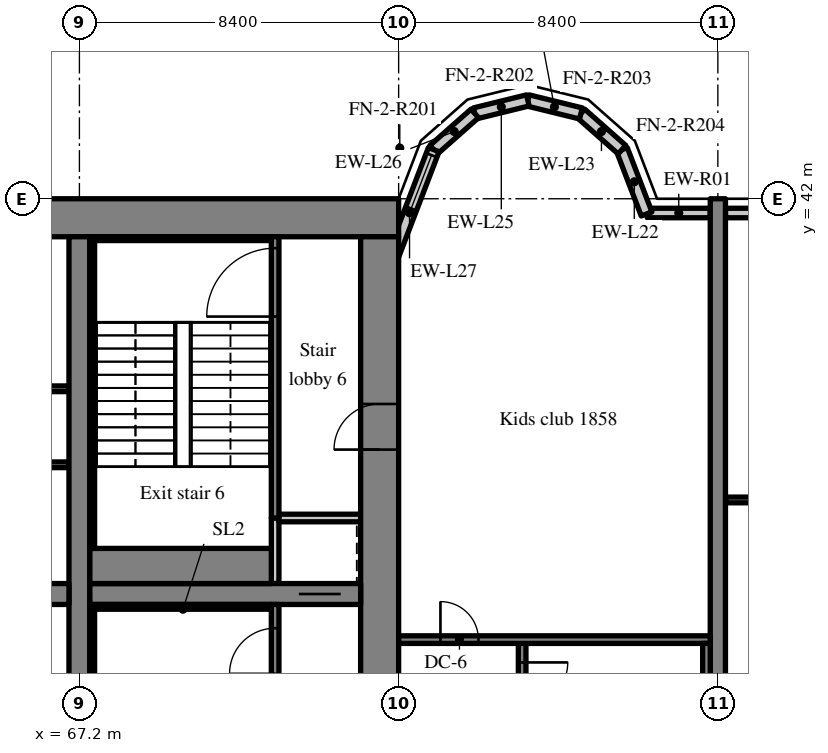
"""IFC4 building model, lengths in metres.
Left out: names, types, materials, properties, quantities, classifications, styles, units other than length and angle.
Written with IfcOpenShell. Run it as: python <this file> out.ifc"""

import sys

from ifc_helpers import new_model, si_unit, direction, frame, frame_2d, origin, place, context, subcontext, project, spatial, rectangle, extrude, source, transform, mapped, element, fill, save


model = new_model("IFC4")
c1 = context("Model", 3, precision=1e-05, world=origin(), true_north=direction((0.0, 1.0)))
c2 = subcontext(c1, "Body", "Model", "MODEL_VIEW")
j1 = project(units=[si_unit("LENGTHUNIT", "METRE"), si_unit("PLANEANGLEUNIT", "RADIAN")], contexts=[c1])
p1 = place(None, origin())
s1 = spatial("IfcSite", under=j1, at=p1, CompositionType="ELEMENT")
p2 = place(p1, origin())
s2 = spatial("IfcBuilding", under=s1, at=p2, CompositionType="ELEMENT")
p3 = place(p2, frame((0.0, 0.0, 77.2)))
s3 = spatial("IfcBuildingStorey", under=s2, at=p3, CompositionType="ELEMENT", Elevation=77.2)
m1 = source(origin(), c2, "Body", "SweptSolid", [
    extrude(rectangle(XDim=50.4, YDim=1.0, at=frame_2d((25.2, 0.0))), origin(), (0.0, 0.0, 1.0), 3.52),
])
p4 = place(p3, frame((25.2, 41.5, 0.0), z_axis=(0.0, 0.0, 1.0), x_axis=(1.0, 0.0, 0.0)))
e1 = element("IfcWall", 1, at=p4, inside=s3, PredefinedType="SHEAR", context=c2, shape_type="MappedRepresentation", body=[
    mapped(m1, transform((0.0, 0.0, 0.0), scale=1.0)),
])
m2 = source(origin(), c2, "Body", "SweptSolid", [
    extrude(rectangle(XDim=18.0, YDim=1.0, at=frame_2d((9.0, 0.0))), origin(), (0.0, 0.0, 1.0), 3.52),
])
p5 = place(p3, frame((75.1, 23.0, 0.0), z_axis=(0.0, 0.0, 1.0), x_axis=(0.0, 1.0, 0.0)))
e2 = element("IfcWall", 2, at=p5, inside=s3, PredefinedType="SHEAR", context=c2, shape_type="MappedRepresentation", body=[
    mapped(m2, transform((0.0, 0.0, 0.0), scale=1.0)),
])
m3 = source(origin(), c2, "Body", "SweptSolid", [
    extrude(rectangle(XDim=1.2, YDim=2.1, at=frame_2d((0.6, 1.05))), frame((0.0, 0.51, 0.0), z_axis=(0.0, -1.0, 0.0), x_axis=(1.0, 0.0, 0.0)), (0.0, 0.0, 1.0), 1.02),
])
p6 = place(p5, frame((12.4, 0.0, 0.0)))
e3 = element("IfcOpeningElement", 3, at=p6, cuts=e2, PredefinedType="OPENING", context=c2, shape_type="MappedRepresentation", body=[
    mapped(m3, transform((0.0, 0.0, 0.0), scale=1.0)),
])
m4 = source(origin(), c2, "Body", "SweptSolid", [
    extrude(rectangle(XDim=18.0, YDim=0.55, at=frame_2d((9.0, 0.0))), origin(), (0.0, 0.0, 1.0), 3.52),
])
p7 = place(p3, frame((67.2, 23.0, 0.0), z_axis=(0.0, 0.0, 1.0), x_axis=(0.0, 1.0, 0.0)))
e4 = element("IfcWall", 4, at=p7, inside=s3, PredefinedType="SHEAR", context=c2, shape_type="MappedRepresentation", body=[
    mapped(m4, transform((0.0, 0.0, 0.0), scale=1.0)),
])
m5 = source(origin(), c2, "Body", "SweptSolid", [
    extrude(rectangle(XDim=16.25, YDim=0.55, at=frame_2d((8.125, 0.0))), origin(), (0.0, 0.0, 1.0), 3.52),
])
p8 = place(p3, frame((50.675, 31.6, 0.0), z_axis=(0.0, 0.0, 1.0), x_axis=(1.0, 0.0, 0.0)))
e5 = element("IfcWall", 5, at=p8, inside=s3, PredefinedType="SHEAR", context=c2, shape_type="MappedRepresentation", body=[
    mapped(m5, transform((0.0, 0.0, 0.0), scale=1.0)),
])
m6 = source(origin(), c2, "Body", "SweptSolid", [
    extrude(rectangle(XDim=1.0, YDim=2.1, at=frame_2d((0.5, 1.05))), frame((0.0, 0.285, 0.0), z_axis=(0.0, -1.0, 0.0), x_axis=(1.0, 0.0, 0.0)), (0.0, 0.0, 1.0), 0.57),
])
p9 = place(p8, frame((0.562, 0.0, 0.0)))
e6 = element("IfcOpeningElement", 6, at=p9, cuts=e5, PredefinedType="OPENING", context=c2, shape_type="MappedRepresentation", body=[
    mapped(m6, transform((0.0, 0.0, 0.0), scale=1.0)),
])
m7 = source(origin(), c2, "Body", "SweptSolid", [
    extrude(rectangle(XDim=7.125, YDim=0.55, at=frame_2d((3.562, 0.0))), origin(), (0.0, 0.0, 1.0), 3.52),
])
p10 = place(p3, frame((67.475, 31.6, 0.0), z_axis=(0.0, 0.0, 1.0), x_axis=(1.0, 0.0, 0.0)))
e7 = element("IfcWall", 7, at=p10, inside=s3, PredefinedType="SHEAR", context=c2, shape_type="MappedRepresentation", body=[
    mapped(m7, transform((0.0, 0.0, 0.0), scale=1.0)),
])
m8 = source(origin(), c2, "Body", "SweptSolid", [
    extrude(rectangle(XDim=1.1, YDim=2.1, at=frame_2d((0.55, 1.05))), frame((0.0, 0.285, 0.0), z_axis=(0.0, -1.0, 0.0), x_axis=(1.0, 0.0, 0.0)), (0.0, 0.0, 1.0), 0.57),
])
p11 = place(p10, frame((5.5, 0.0, 0.0)))
e8 = element("IfcOpeningElement", 8, at=p11, cuts=e7, PredefinedType="OPENING", context=c2, shape_type="MappedRepresentation", body=[
    mapped(m8, transform((0.0, 0.0, 0.0), scale=1.0)),
])
m9 = source(origin(), c2, "Body", "SweptSolid", [
    extrude(rectangle(XDim=20.0, YDim=0.4, at=frame_2d((10.0, 0.0))), origin(), (0.0, 0.0, 1.0), 3.52),
])
p12 = place(p3, frame((84.0, 22.0, 0.0), z_axis=(0.0, 0.0, 1.0), x_axis=(0.0, 1.0, 0.0)))
e9 = element("IfcWall", 9, at=p12, inside=s3, PredefinedType="SHEAR", context=c2, shape_type="MappedRepresentation", body=[
    mapped(m9, transform((0.0, 0.0, 0.0), scale=1.0)),
])
m10 = source(origin(), c2, "Body", "SweptSolid", [
    extrude(rectangle(XDim=1.658, YDim=0.25, at=frame_2d((0.829, 0.0))), origin(), (0.0, 0.0, 1.0), 2.82),
])
p13 = place(p3, frame((83.8, 41.625, 0.0), z_axis=(0.0, 0.0, 1.0), x_axis=(-1.0, 0.0, 0.0)))
e10 = element("IfcWall", 10, at=p13, inside=s3, PredefinedType="SOLIDWALL", context=c2, shape_type="MappedRepresentation", body=[
    mapped(m10, transform((0.0, 0.0, 0.0), scale=1.0)),
])
m11 = source(origin(), c2, "Body", "SweptSolid", [
    extrude(rectangle(XDim=3.6, YDim=0.25, at=frame_2d((1.8, 0.0))), origin(), (0.0, 0.0, 1.0), 2.82),
])
p14 = place(p3, frame((87.8, 41.625, 0.0), z_axis=(0.0, 0.0, 1.0), x_axis=(-1.0, 0.0, 0.0)))
e11 = element("IfcWall", 11, at=p14, inside=s3, PredefinedType="SOLIDWALL", context=c2, shape_type="MappedRepresentation", body=[
    mapped(m11, transform((0.0, 0.0, 0.0), scale=1.0)),
])
m12 = source(origin(), c2, "Body", "SweptSolid", [
    extrude(rectangle(XDim=1.5, YDim=1.5, at=frame_2d((0.75, 0.75))), frame((0.0, 0.135, 0.0), z_axis=(0.0, -1.0, 0.0), x_axis=(1.0, 0.0, 0.0)), (0.0, 0.0, 1.0), 0.27),
])
p15 = place(p14, frame((1.05, 0.0, 0.9)))
e12 = element("IfcOpeningElement", 12, at=p15, cuts=e11, PredefinedType="OPENING", context=c2, shape_type="MappedRepresentation", body=[
    mapped(m12, transform((0.0, 0.0, 0.0), scale=1.0)),
])
m13 = source(origin(), c2, "Body", "SweptSolid", [
    extrude(rectangle(XDim=1.812, YDim=0.3, at=frame_2d((0.906, 0.0))), origin(), (0.0, 0.0, 1.0), 3.52),
])
p16 = place(p3, frame((82.125, 41.6, 0.0), z_axis=(0.0, 0.0, 1.0), x_axis=(-0.357877270961, 0.93376863244, 0.0)))
e13 = element("IfcWall", 13, at=p16, inside=s3, PredefinedType="SOLIDWALL", context=c2, shape_type="MappedRepresentation", body=[
    mapped(m13, transform((0.0, 0.0, 0.0), scale=1.0)),
])
m14 = source(origin(), c2, "Body", "SweptSolid", [
    extrude(rectangle(XDim=1.44, YDim=0.3, at=frame_2d((0.72, 0.0))), origin(), (0.0, 0.0, 1.0), 3.52),
])
p17 = place(p3, frame((81.477, 43.292, 0.0), z_axis=(0.0, 0.0, 1.0), x_axis=(-0.74957555648, 0.661918790432, 0.0)))
e14 = element("IfcWall", 14, at=p17, inside=s3, PredefinedType="SOLIDWALL", context=c2, shape_type="MappedRepresentation", body=[
    mapped(m14, transform((0.0, 0.0, 0.0), scale=1.0)),
])
m15 = source(origin(), c2, "Body", "SweptSolid", [
    extrude(rectangle(XDim=1.439, YDim=0.3, at=frame_2d((0.719, 0.0))), origin(), (0.0, 0.0, 1.0), 3.52),
])
for number, where, z_axis, x_axis in (
    (15, (80.397, 44.245, 0.0), (0.0, 0.0, 1.0), (-0.971, 0.238, 0.0)),
    (16, (79.0, 44.588, 0.0), (0.0, 0.0, 1.0), (-0.971, -0.238, 0.0)),
):
    element("IfcWall", number, at=place(p3, frame(where, z_axis=z_axis, x_axis=x_axis)), inside=s3, PredefinedType="SOLIDWALL", context=c2, shape_type="MappedRepresentation", body=[
        mapped(m15, transform((0.0, 0.0, 0.0), scale=1.0)),
    ])
p18 = place(p3, frame((77.603, 44.245, 0.0), z_axis=(0.0, 0.0, 1.0), x_axis=(-0.74957555648, -0.661918790432, 0.0)))
e17 = element("IfcWall", 17, at=p18, inside=s3, PredefinedType="SOLIDWALL", context=c2, shape_type="MappedRepresentation", body=[
    mapped(m14, transform((0.0, 0.0, 0.0), scale=1.0)),
])
m16 = source(origin(), c2, "Body", "SweptSolid", [
    extrude(rectangle(XDim=3.559, YDim=0.3, at=frame_2d((1.78, 0.0))), origin(), (0.0, 0.0, 1.0), 3.52),
])
p19 = place(p3, frame((76.523, 43.292, 0.0), z_axis=(0.0, 0.0, 1.0), x_axis=(-0.35779745313, -0.933799219604, 0.0)))
e18 = element("IfcWall", 18, at=p19, inside=s3, PredefinedType="SOLIDWALL", context=c2, shape_type="MappedRepresentation", body=[
    mapped(m16, transform((0.0, 0.0, 0.0), scale=1.0)),
])
m17 = source(origin(), c2, "Body", "SweptSolid", [
    extrude(rectangle(XDim=1.5, YDim=2.0, at=frame_2d((0.75, 1.0))), frame((0.0, 0.16, 0.0), z_axis=(0.0, -1.0, 0.0), x_axis=(1.0, 0.0, 0.0)), (0.0, 0.0, 1.0), 0.32),
])
p20 = place(p19, frame((0.156, 0.0, 0.9)))
e19 = element("IfcOpeningElement", 19, at=p20, cuts=e18, PredefinedType="OPENING", context=c2, shape_type="MappedRepresentation", body=[
    mapped(m17, transform((0.0, 0.0, 0.0), scale=1.0)),
])
m18 = source(origin(), c2, "Body", "SweptSolid", [
    extrude(rectangle(XDim=14.125, YDim=0.15, at=frame_2d((7.062, 0.0))), origin(), (0.0, 0.0, 1.0), 3.52),
])
p21 = place(p3, frame((66.925, 35.0, 0.0), z_axis=(0.0, 0.0, 1.0), x_axis=(-1.0, 0.0, 0.0)))
e20 = element("IfcWall", 20, at=p21, inside=s3, PredefinedType="PARTITIONING", context=c2, shape_type="MappedRepresentation", body=[
    mapped(m18, transform((0.0, 0.0, 0.0), scale=1.0)),
])
m19 = source(origin(), c2, "Body", "SweptSolid", [
    extrude(rectangle(XDim=0.9, YDim=2.1, at=frame_2d((0.45, 1.05))), frame((0.0, 0.085, 0.0), z_axis=(0.0, -1.0, 0.0), x_axis=(1.0, 0.0, 0.0)), (0.0, 0.0, 1.0), 0.17),
])
p22 = place(p21, frame((6.575, 0.0, 0.0)))
e21 = element("IfcOpeningElement", 21, at=p22, cuts=e20, PredefinedType="OPENING", context=c2, shape_type="MappedRepresentation", body=[
    mapped(m19, transform((0.0, 0.0, 0.0), scale=1.0)),
])
m20 = source(origin(), c2, "Body", "SweptSolid", [
    extrude(rectangle(XDim=16.25, YDim=0.15, at=frame_2d((8.125, 0.0))), origin(), (0.0, 0.0, 1.0), 3.52),
])
p23 = place(p3, frame((66.925, 37.0, 0.0), z_axis=(0.0, 0.0, 1.0), x_axis=(-1.0, 0.0, 0.0)))
e22 = element("IfcWall", 22, at=p23, inside=s3, PredefinedType="PARTITIONING", context=c2, shape_type="MappedRepresentation", body=[
    mapped(m20, transform((0.0, 0.0, 0.0), scale=1.0)),
])
p24 = place(p23, frame((3.206, 0.0, 0.0)))
e23 = element("IfcOpeningElement", 23, at=p24, cuts=e22, PredefinedType="OPENING", context=c2, shape_type="MappedRepresentation", body=[
    mapped(m19, transform((0.0, 0.0, 0.0), scale=1.0)),
])
p25 = place(p23, frame((8.081, 0.0, 0.0)))
e24 = element("IfcOpeningElement", 24, at=p25, cuts=e22, PredefinedType="OPENING", context=c2, shape_type="MappedRepresentation", body=[
    mapped(m19, transform((0.0, 0.0, 0.0), scale=1.0)),
])
p26 = place(p23, frame((11.331, 0.0, 0.0)))
e25 = element("IfcOpeningElement", 25, at=p26, cuts=e22, PredefinedType="OPENING", context=c2, shape_type="MappedRepresentation", body=[
    mapped(m19, transform((0.0, 0.0, 0.0), scale=1.0)),
])
p27 = place(p23, frame((14.581, 0.0, 0.0)))
e26 = element("IfcOpeningElement", 26, at=p27, cuts=e22, PredefinedType="OPENING", context=c2, shape_type="MappedRepresentation", body=[
    mapped(m19, transform((0.0, 0.0, 0.0), scale=1.0)),
])
m21 = source(origin(), c2, "Body", "SweptSolid", [
    extrude(rectangle(XDim=8.325, YDim=0.2, at=frame_2d((4.163, 0.0))), origin(), (0.0, 0.0, 1.0), 3.52),
])
p28 = place(p3, frame((72.35, 23.0, 0.0), z_axis=(0.0, 0.0, 1.0), x_axis=(0.0, 1.0, 0.0)))
e27 = element("IfcWall", 27, at=p28, inside=s3, PredefinedType="SOLIDWALL", context=c2, shape_type="MappedRepresentation", body=[
    mapped(m21, transform((0.0, 0.0, 0.0), scale=1.0)),
])
m22 = source(origin(), c2, "Body", "SweptSolid", [
    extrude(rectangle(XDim=1.2, YDim=2.1, at=frame_2d((0.6, 1.05))), frame((0.0, 0.11, 0.0), z_axis=(0.0, -1.0, 0.0), x_axis=(1.0, 0.0, 0.0)), (0.0, 0.0, 1.0), 0.22),
])
p29 = place(p28, frame((6.5, 0.0, 0.0)))
e28 = element("IfcOpeningElement", 28, at=p29, cuts=e27, PredefinedType="OPENING", context=c2, shape_type="MappedRepresentation", body=[
    mapped(m22, transform((0.0, 0.0, 0.0), scale=1.0)),
])
m23 = source(origin(), c2, "Body", "SweptSolid", [
    extrude(rectangle(XDim=1.725, YDim=0.2, at=frame_2d((0.863, 0.0))), origin(), (0.0, 0.0, 1.0), 3.52),
])
p30 = place(p3, frame((72.35, 31.875, 0.0), z_axis=(0.0, 0.0, 1.0), x_axis=(0.0, 1.0, 0.0)))
e29 = element("IfcWall", 29, at=p30, inside=s3, PredefinedType="SOLIDWALL", context=c2, shape_type="MappedRepresentation", body=[
    mapped(m23, transform((0.0, 0.0, 0.0), scale=1.0)),
])
m24 = source(origin(), c2, "Body", "SweptSolid", [
    extrude(rectangle(XDim=2.15, YDim=0.2, at=frame_2d((1.075, 0.0))), origin(), (0.0, 0.0, 1.0), 3.52),
])
p31 = place(p3, frame((72.45, 33.6, 0.0), z_axis=(0.0, 0.0, 1.0), x_axis=(1.0, 0.0, 0.0)))
e30 = element("IfcWall", 30, at=p31, inside=s3, PredefinedType="SOLIDWALL", context=c2, shape_type="MappedRepresentation", body=[
    mapped(m24, transform((0.0, 0.0, 0.0), scale=1.0)),
])
m25 = source(origin(), c2, "Body", "SweptSolid", [
    extrude(rectangle(XDim=7.4, YDim=0.2, at=frame_2d((3.7, 0.0))), origin(), (0.0, 0.0, 1.0), 3.52),
])
p32 = place(p3, frame((72.35, 33.6, 0.0), z_axis=(0.0, 0.0, 1.0), x_axis=(0.0, 1.0, 0.0)))
e31 = element("IfcWall", 31, at=p32, inside=s3, PredefinedType="SOLIDWALL", context=c2, shape_type="MappedRepresentation", body=[
    mapped(m25, transform((0.0, 0.0, 0.0), scale=1.0)),
])
m26 = source(origin(), c2, "Body", "SweptSolid", [
    extrude(rectangle(XDim=1.8, YDim=2.1, at=frame_2d((0.9, 1.05))), frame((0.0, 0.11, 0.0), z_axis=(0.0, -1.0, 0.0), x_axis=(1.0, 0.0, 0.0)), (0.0, 0.0, 1.0), 0.22),
])
p33 = place(p32, frame((5.3, 0.0, 0.0)))
e32 = element("IfcOpeningElement", 32, at=p33, cuts=e31, PredefinedType="OPENING", context=c2, shape_type="MappedRepresentation", body=[
    mapped(m26, transform((0.0, 0.0, 0.0), scale=1.0)),
])
m27 = source(origin(), c2, "Body", "SweptSolid", [
    extrude(rectangle(XDim=8.3, YDim=0.2, at=frame_2d((4.15, 0.0))), origin(), (0.0, 0.0, 1.0), 3.52),
])
p34 = place(p3, frame((78.85, 22.1, 0.0), z_axis=(0.0, 0.0, 1.0), x_axis=(0.0, 1.0, 0.0)))
e33 = element("IfcWall", 33, at=p34, inside=s3, PredefinedType="SOLIDWALL", context=c2, shape_type="MappedRepresentation", body=[
    mapped(m27, transform((0.0, 0.0, 0.0), scale=1.0)),
])
p35 = place(p34, frame((6.5, 0.0, 0.0)))
e34 = element("IfcOpeningElement", 34, at=p35, cuts=e33, PredefinedType="OPENING", context=c2, shape_type="MappedRepresentation", body=[
    mapped(m22, transform((0.0, 0.0, 0.0), scale=1.0)),
])
m28 = source(origin(), c2, "Body", "SweptSolid", [
    extrude(rectangle(XDim=8.2, YDim=0.2, at=frame_2d((4.1, 0.0))), origin(), (0.0, 0.0, 1.0), 3.52),
])
p36 = place(p3, frame((83.8, 30.4, 0.0), z_axis=(0.0, 0.0, 1.0), x_axis=(-1.0, 0.0, 0.0)))
e35 = element("IfcWall", 35, at=p36, inside=s3, PredefinedType="SOLIDWALL", context=c2, shape_type="MappedRepresentation", body=[
    mapped(m28, transform((0.0, 0.0, 0.0), scale=1.0)),
])
m29 = source(origin(), c2, "Body", "SweptSolid", [
    extrude(rectangle(XDim=1.0, YDim=2.1, at=frame_2d((0.5, 1.05))), frame((0.0, 0.11, 0.0), z_axis=(0.0, -1.0, 0.0), x_axis=(1.0, 0.0, 0.0)), (0.0, 0.0, 1.0), 0.22),
])
p37 = place(p36, frame((6.1, 0.0, 0.0)))
e36 = element("IfcOpeningElement", 36, at=p37, cuts=e35, PredefinedType="OPENING", context=c2, shape_type="MappedRepresentation", body=[
    mapped(m29, transform((0.0, 0.0, 0.0), scale=1.0)),
])
m30 = source(origin(), c2, "Body", "SweptSolid", [
    extrude(rectangle(XDim=4.775, YDim=0.125, at=frame_2d((2.387, 0.0))), origin(), (0.0, 0.0, 1.0), 3.52),
])
p38 = place(p3, frame((67.475, 31.262, 0.0), z_axis=(0.0, 0.0, 1.0), x_axis=(1.0, 0.0, 0.0)))
e37 = element("IfcWall", 37, at=p38, inside=s3, PredefinedType="SOLIDWALL", context=c2, shape_type="MappedRepresentation", body=[
    mapped(m30, transform((0.0, 0.0, 0.0), scale=1.0)),
])
m31 = source(origin(), c2, "Body", "SweptSolid", [
    extrude(rectangle(XDim=8.1, YDim=0.125, at=frame_2d((4.05, 0.0))), origin(), (0.0, 0.0, 1.0), 3.52),
])
p39 = place(p3, frame((67.537, 23.1, 0.0), z_axis=(0.0, 0.0, 1.0), x_axis=(0.0, 1.0, 0.0)))
e38 = element("IfcWall", 38, at=p39, inside=s3, PredefinedType="SOLIDWALL", context=c2, shape_type="MappedRepresentation", body=[
    mapped(m31, transform((0.0, 0.0, 0.0), scale=1.0)),
])
m32 = source(origin(), c2, "Body", "SweptSolid", [
    extrude(rectangle(XDim=4.775, YDim=0.1, at=frame_2d((2.387, 0.0))), origin(), (0.0, 0.0, 1.0), 3.52),
])
p40 = place(p3, frame((67.475, 40.95, 0.0), z_axis=(0.0, 0.0, 1.0), x_axis=(1.0, 0.0, 0.0)))
e39 = element("IfcWall", 39, at=p40, inside=s3, PredefinedType="SOLIDWALL", context=c2, shape_type="MappedRepresentation", body=[
    mapped(m32, transform((0.0, 0.0, 0.0), scale=1.0)),
])
m33 = source(origin(), c2, "Body", "SweptSolid", [
    extrude(rectangle(XDim=4.775, YDim=0.925, at=frame_2d((2.387, 0.0))), origin(), (0.0, 0.0, 1.0), 3.52),
])
p41 = place(p3, frame((67.475, 32.337, 0.0), z_axis=(0.0, 0.0, 1.0), x_axis=(1.0, 0.0, 0.0)))
e40 = element("IfcWall", 40, at=p41, inside=s3, PredefinedType="SOLIDWALL", context=c2, shape_type="MappedRepresentation", body=[
    mapped(m33, transform((0.0, 0.0, 0.0), scale=1.0)),
])
p42 = place(p3, frame((67.537, 32.8, 0.0), z_axis=(0.0, 0.0, 1.0), x_axis=(0.0, 1.0, 0.0)))
e41 = element("IfcWall", 41, at=p42, inside=s3, PredefinedType="SOLIDWALL", context=c2, shape_type="MappedRepresentation", body=[
    mapped(m31, transform((0.0, 0.0, 0.0), scale=1.0)),
])
m34 = source(origin(), c2, "Body", "SweptSolid", [
    extrude(rectangle(XDim=8.1, YDim=0.2, at=frame_2d((4.05, 0.0))), origin(), (0.0, 0.0, 1.0), 3.52),
])
p43 = place(p3, frame((83.7, 22.2, 0.0), z_axis=(0.0, 0.0, 1.0), x_axis=(0.0, 1.0, 0.0)))
e42 = element("IfcWall", 42, at=p43, inside=s3, PredefinedType="SOLIDWALL", context=c2, shape_type="MappedRepresentation", body=[
    mapped(m34, transform((0.0, 0.0, 0.0), scale=1.0)),
])
m35 = source(origin(), c2, "Body", "SweptSolid", [
    extrude(rectangle(XDim=8.0, YDim=0.15, at=frame_2d((4.0, 0.0))), origin(), (0.0, 0.0, 1.0), 3.52),
])
p44 = place(p3, frame((84.2, 34.075, 0.0), z_axis=(0.0, 0.0, 1.0), x_axis=(1.0, 0.0, 0.0)))
e43 = element("IfcWall", 43, at=p44, inside=s3, PredefinedType="PARTITIONING", context=c2, shape_type="MappedRepresentation", body=[
    mapped(m35, transform((0.0, 0.0, 0.0), scale=1.0)),
])
m36 = source(origin(), c2, "Body", "SweptSolid", [
    extrude(rectangle(XDim=1.0, YDim=2.1, at=frame_2d((0.5, 1.05))), frame((0.0, 0.085, 0.0), z_axis=(0.0, -1.0, 0.0), x_axis=(1.0, 0.0, 0.0)), (0.0, 0.0, 1.0), 0.17),
])
p45 = place(p44, frame((0.7, 0.0, 0.0)))
e44 = element("IfcOpeningElement", 44, at=p45, cuts=e43, PredefinedType="OPENING", context=c2, shape_type="MappedRepresentation", body=[
    mapped(m36, transform((0.0, 0.0, 0.0), scale=1.0)),
])
m37 = source(origin(), c2, "Body", "SweptSolid", [
    extrude(rectangle(XDim=1.5, YDim=2.0, at=frame_2d((0.75, 1.0))), frame((0.0, 0.03, 0.0), z_axis=(0.0, -1.0, 0.0), x_axis=(1.0, 0.0, 0.0)), (0.0, 0.0, 1.0), 0.06),
])
p46 = place(p20, origin())
e45 = element("IfcWindow", 45, at=p46, inside=s3, PartitioningType="SINGLE_PANEL", PredefinedType="WINDOW", context=c2, shape_type="MappedRepresentation", body=[
    mapped(m37, transform((0.0, 0.0, 0.0), scale=1.0)),
])
fill(e19, e45)
m38 = source(origin(), c2, "Body", "SweptSolid", [
    extrude(rectangle(XDim=1.2, YDim=2.1, at=frame_2d((0.6, 1.05))), frame((0.0, 0.025, 0.0), z_axis=(0.0, -1.0, 0.0), x_axis=(1.0, 0.0, 0.0)), (0.0, 0.0, 1.0), 0.05),
])
p47 = place(p29, origin())
e46 = element("IfcDoor", 46, at=p47, inside=s3, OperationType="SINGLE_SWING_LEFT", PredefinedType="DOOR", context=c2, shape_type="MappedRepresentation", body=[
    mapped(m38, transform((0.0, 0.0, 0.0), scale=1.0)),
])
fill(e28, e46)
m39 = source(origin(), c2, "Body", "SweptSolid", [
    extrude(rectangle(XDim=1.1, YDim=2.1, at=frame_2d((0.55, 1.05))), frame((0.0, 0.025, 0.0), z_axis=(0.0, -1.0, 0.0), x_axis=(1.0, 0.0, 0.0)), (0.0, 0.0, 1.0), 0.05),
])
p48 = place(p11, origin())
e47 = element("IfcDoor", 47, at=p48, inside=s3, OperationType="SLIDING_TO_RIGHT", PredefinedType="DOOR", context=c2, shape_type="MappedRepresentation", body=[
    mapped(m39, transform((0.0, 0.0, 0.0), scale=1.0)),
])
fill(e8, e47)
m40 = source(origin(), c2, "Body", "SweptSolid", [
    extrude(rectangle(XDim=1.8, YDim=2.1, at=frame_2d((0.9, 1.05))), frame((0.0, 0.025, 0.0), z_axis=(0.0, -1.0, 0.0), x_axis=(1.0, 0.0, 0.0)), (0.0, 0.0, 1.0), 0.05),
])
p49 = place(p33, origin())
e48 = element("IfcDoor", 48, at=p49, inside=s3, OperationType="SINGLE_SWING_LEFT", PredefinedType="DOOR", context=c2, shape_type="MappedRepresentation", body=[
    mapped(m40, transform((0.0, 0.0, 0.0), scale=1.0)),
])
fill(e32, e48)
p50 = place(p6, origin())
e49 = element("IfcDoor", 49, at=p50, inside=s3, OperationType="SINGLE_SWING_LEFT", PredefinedType="DOOR", context=c2, shape_type="MappedRepresentation", body=[
    mapped(m38, transform((0.0, 0.0, 0.0), scale=1.0)),
])
fill(e3, e49)
p51 = place(p35, origin())
e50 = element("IfcDoor", 50, at=p51, inside=s3, OperationType="SINGLE_SWING_RIGHT", PredefinedType="DOOR", context=c2, shape_type="MappedRepresentation", body=[
    mapped(m38, transform((0.0, 0.0, 0.0), scale=1.0)),
])
fill(e34, e50)
m41 = source(origin(), c2, "Body", "SweptSolid", [
    extrude(rectangle(XDim=1.0, YDim=2.1, at=frame_2d((0.5, 1.05))), frame((0.0, 0.025, 0.0), z_axis=(0.0, -1.0, 0.0), x_axis=(1.0, 0.0, 0.0)), (0.0, 0.0, 1.0), 0.05),
])
p52 = place(p37, origin())
e51 = element("IfcDoor", 51, at=p52, inside=s3, OperationType="SINGLE_SWING_RIGHT", PredefinedType="DOOR", context=c2, shape_type="MappedRepresentation", body=[
    mapped(m41, transform((0.0, 0.0, 0.0), scale=1.0)),
])
fill(e36, e51)
save(model, sys.argv[1])
